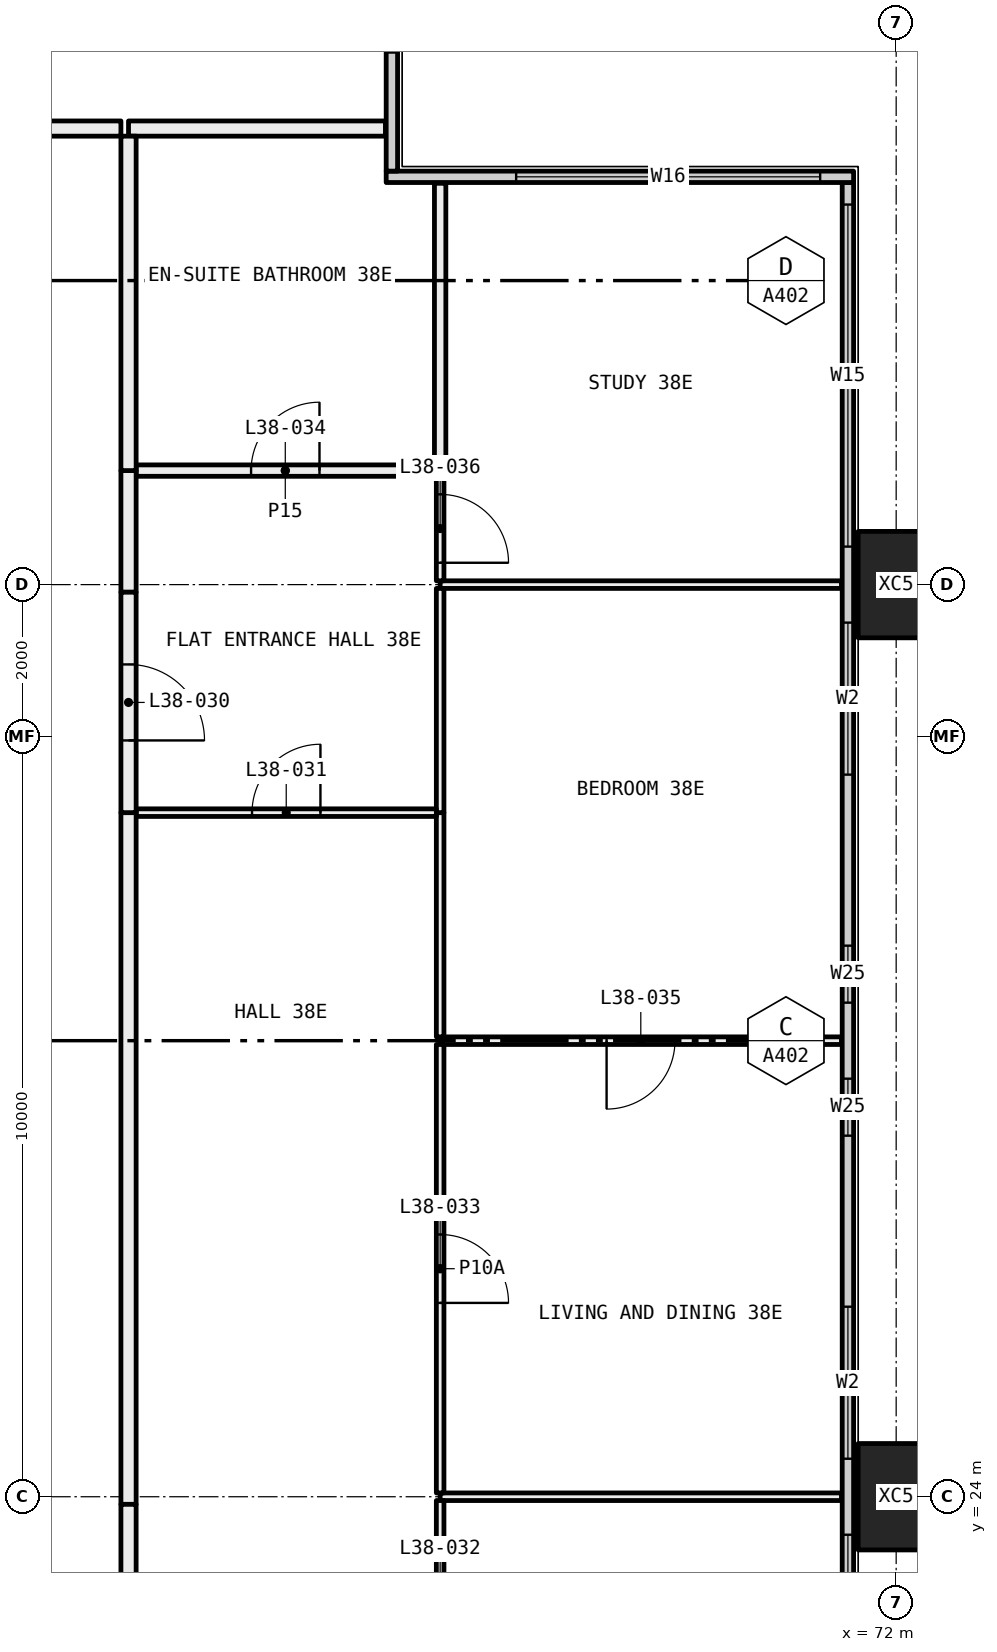
"""IFC4 building model, lengths in metres.
Left out: names, types, materials, properties, quantities, classifications, styles, units other than length and angle.
Written with IfcOpenShell. Run it as: python <this file> out.ifc"""

import sys

from ifc_helpers import new_model, si_unit, direction, frame, frame_2d, origin, origin_2d, place, context, subcontext, project, spatial, rectangle, hollow_rectangle, extrude, element, fill, save


model = new_model("IFC4")
c1 = context("Model", 3, precision=1e-05, world=origin(), true_north=direction((0.0, 1.0)))
c2 = subcontext(c1, "Body", "Model", "MODEL_VIEW")
j1 = project(units=[si_unit("LENGTHUNIT", "METRE"), si_unit("PLANEANGLEUNIT", "RADIAN")], contexts=[c1])
p1 = place(None, origin())
s1 = spatial("IfcSite", under=j1, at=p1, CompositionType="ELEMENT")
p2 = place(p1, origin())
s2 = spatial("IfcBuilding", under=s1, at=p2, CompositionType="ELEMENT")
p3 = place(p2, frame((0.0, 0.0, 144.9)))
s3 = spatial("IfcBuildingStorey", under=s2, at=p3, CompositionType="ELEMENT", Elevation=144.9)
for number, where, z_axis, x_axis in (
    (1, (72.0, 24.0, -0.4), (0.0, 0.0, 1.0), (0.0, 1.0, 0.0)),
    (2, (72.0, 36.0, -0.4), (0.0, 0.0, 1.0), (0.0, 1.0, 0.0)),
):
    element("IfcColumn", number, at=place(p3, frame(where, z_axis=z_axis, x_axis=x_axis)), inside=s3, PredefinedType="COLUMN", context=c2, shape_type="SweptSolid", body=[
        extrude(hollow_rectangle(XDim=1.4, YDim=1.0, WallThickness=0.055, at=origin_2d()), origin(), (0.0, 0.0, 1.0), 3.45),
    ])
p4 = place(p3, frame((71.365, 18.71, 0.0), z_axis=(0.0, 0.0, 1.0), x_axis=(0.0, 1.0, 0.0)))
e3 = element("IfcWall", 3, at=p4, inside=s3, PredefinedType="ELEMENTEDWALL", context=c2, shape_type="SweptSolid", body=[
    extrude(rectangle(XDim=22.58, YDim=0.15, at=frame_2d((11.29, 0.0))), origin(), (0.0, 0.0, 1.0), 3.05),
])
p5 = place(p4, frame((0.29, 0.0, 0.45)))
e4 = element("IfcOpeningElement", 4, at=p5, cuts=e3, PredefinedType="OPENING", context=c2, shape_type="SweptSolid", body=[
    extrude(rectangle(XDim=4.5, YDim=2.55, at=frame_2d((2.25, 1.275))), frame((0.0, 0.085, 0.0), z_axis=(0.0, -1.0, 0.0), x_axis=(1.0, 0.0, 0.0)), (0.0, 0.0, 1.0), 0.17),
])
p6 = place(p4, frame((5.79, 0.0, 0.45)))
e5 = element("IfcOpeningElement", 5, at=p6, cuts=e3, PredefinedType="OPENING", context=c2, shape_type="SweptSolid", body=[
    extrude(rectangle(XDim=2.0, YDim=2.55, at=frame_2d((1.0, 1.275))), frame((0.0, 0.085, 0.0), z_axis=(0.0, -1.0, 0.0), x_axis=(1.0, 0.0, 0.0)), (0.0, 0.0, 1.0), 0.17),
])
p7 = place(p4, frame((10.04, 0.0, 0.45)))
e6 = element("IfcOpeningElement", 6, at=p7, cuts=e3, PredefinedType="OPENING", context=c2, shape_type="SweptSolid", body=[
    extrude(rectangle(XDim=0.75, YDim=2.55, at=frame_2d((0.375, 1.275))), frame((0.0, 0.085, 0.0), z_axis=(0.0, -1.0, 0.0), x_axis=(1.0, 0.0, 0.0)), (0.0, 0.0, 1.0), 0.17),
])
p8 = place(p4, frame((11.79, 0.0, 0.45)))
e7 = element("IfcOpeningElement", 7, at=p8, cuts=e3, PredefinedType="OPENING", context=c2, shape_type="SweptSolid", body=[
    extrude(rectangle(XDim=0.75, YDim=2.55, at=frame_2d((0.375, 1.275))), frame((0.0, 0.085, 0.0), z_axis=(0.0, -1.0, 0.0), x_axis=(1.0, 0.0, 0.0)), (0.0, 0.0, 1.0), 0.17),
])
p9 = place(p4, frame((14.79, 0.0, 0.45)))
e8 = element("IfcOpeningElement", 8, at=p9, cuts=e3, PredefinedType="OPENING", context=c2, shape_type="SweptSolid", body=[
    extrude(rectangle(XDim=2.0, YDim=2.55, at=frame_2d((1.0, 1.275))), frame((0.0, 0.085, 0.0), z_axis=(0.0, -1.0, 0.0), x_axis=(1.0, 0.0, 0.0)), (0.0, 0.0, 1.0), 0.17),
])
p10 = place(p4, frame((17.79, 0.0, 0.45)))
e9 = element("IfcOpeningElement", 9, at=p10, cuts=e3, PredefinedType="OPENING", context=c2, shape_type="SweptSolid", body=[
    extrude(rectangle(XDim=4.5, YDim=2.55, at=frame_2d((2.25, 1.275))), frame((0.0, 0.085, 0.0), z_axis=(0.0, -1.0, 0.0), x_axis=(1.0, 0.0, 0.0)), (0.0, 0.0, 1.0), 0.17),
])
p11 = place(p3, frame((65.29, 41.365, 0.0), z_axis=(0.0, 0.0, 1.0), x_axis=(1.0, 0.0, 0.0)))
e10 = element("IfcWall", 10, at=p11, inside=s3, PredefinedType="ELEMENTEDWALL", context=c2, shape_type="SweptSolid", body=[
    extrude(rectangle(XDim=6.15, YDim=0.15, at=frame_2d((3.075, 0.0))), origin(), (0.0, 0.0, 1.0), 3.05),
])
p12 = place(p11, frame((1.71, 0.0, 0.45)))
e11 = element("IfcOpeningElement", 11, at=p12, cuts=e10, PredefinedType="OPENING", context=c2, shape_type="SweptSolid", body=[
    extrude(rectangle(XDim=4.0, YDim=2.55, at=frame_2d((2.0, 1.275))), frame((0.0, 0.085, 0.0), z_axis=(0.0, -1.0, 0.0), x_axis=(1.0, 0.0, 0.0)), (0.0, 0.0, 1.0), 0.17),
])
p13 = place(p3, frame((65.365, 41.44, 0.0), z_axis=(0.0, 0.0, 1.0), x_axis=(0.0, 1.0, 0.0)))
e12 = element("IfcWall", 12, at=p13, inside=s3, PredefinedType="ELEMENTEDWALL", context=c2, shape_type="SweptSolid", body=[
    extrude(rectangle(XDim=5.85, YDim=0.15, at=frame_2d((2.925, 0.0))), origin(), (0.0, 0.0, 1.0), 3.05),
])
p14 = place(p13, frame((1.56, 0.0, 0.45)))
e13 = element("IfcOpeningElement", 13, at=p14, cuts=e12, PredefinedType="OPENING", context=c2, shape_type="SweptSolid", body=[
    extrude(rectangle(XDim=4.0, YDim=2.55, at=frame_2d((2.0, 1.275))), frame((0.0, 0.085, 0.0), z_axis=(0.0, -1.0, 0.0), x_axis=(1.0, 0.0, 0.0)), (0.0, 0.0, 1.0), 0.17),
])
p15 = place(p3, frame((71.28, 24.0, 0.0), z_axis=(0.0, 0.0, 1.0), x_axis=(-1.0, 0.0, 0.0)))
e14 = element("IfcWall", 14, at=p15, inside=s3, PredefinedType="PARTITIONING", context=c2, shape_type="SweptSolid", body=[
    extrude(rectangle(XDim=5.28, YDim=0.1, at=frame_2d((2.64, 0.0))), origin(), (0.0, 0.0, 1.0), 2.45),
])
p16 = place(p3, frame((66.0, 23.95, 0.0), z_axis=(0.0, 0.0, 1.0), x_axis=(0.0, -1.0, 0.0)))
e15 = element("IfcWall", 15, at=p16, inside=s3, PredefinedType="PARTITIONING", context=c2, shape_type="SweptSolid", body=[
    extrude(rectangle(XDim=2.875, YDim=0.1, at=frame_2d((1.438, 0.0))), origin(), (0.0, 0.0, 1.0), 2.45),
])
p17 = place(p16, frame((0.988, 0.0, 0.0)))
e16 = element("IfcOpeningElement", 16, at=p17, cuts=e15, PredefinedType="OPENING", context=c2, shape_type="SweptSolid", body=[
    extrude(rectangle(XDim=0.9, YDim=2.1, at=frame_2d((0.45, 1.05))), frame((0.0, 0.06, 0.0), z_axis=(0.0, -1.0, 0.0), x_axis=(1.0, 0.0, 0.0)), (0.0, 0.0, 1.0), 0.12),
])
p18 = place(p3, frame((71.28, 30.0, 0.0), z_axis=(0.0, 0.0, 1.0), x_axis=(-1.0, 0.0, 0.0)))
e17 = element("IfcWall", 17, at=p18, inside=s3, PredefinedType="PARTITIONING", context=c2, shape_type="SweptSolid", body=[
    extrude(rectangle(XDim=5.28, YDim=0.1, at=frame_2d((2.64, 0.0))), origin(), (0.0, 0.0, 1.0), 3.05),
])
p19 = place(p18, frame((2.19, 0.0, 0.0)))
e18 = element("IfcOpeningElement", 18, at=p19, cuts=e17, PredefinedType="OPENING", context=c2, shape_type="SweptSolid", body=[
    extrude(rectangle(XDim=0.9, YDim=2.1, at=frame_2d((0.45, 1.05))), frame((0.0, 0.06, 0.0), z_axis=(0.0, -1.0, 0.0), x_axis=(1.0, 0.0, 0.0)), (0.0, 0.0, 1.0), 0.12),
])
p20 = place(p3, frame((66.0, 29.95, 0.0), z_axis=(0.0, 0.0, 1.0), x_axis=(0.0, -1.0, 0.0)))
e19 = element("IfcWall", 19, at=p20, inside=s3, PredefinedType="PARTITIONING", context=c2, shape_type="SweptSolid", body=[
    extrude(rectangle(XDim=5.9, YDim=0.1, at=frame_2d((2.95, 0.0))), origin(), (0.0, 0.0, 1.0), 2.45),
])
p21 = place(p20, frame((2.5, 0.0, 0.0)))
e20 = element("IfcOpeningElement", 20, at=p21, cuts=e19, PredefinedType="OPENING", context=c2, shape_type="SweptSolid", body=[
    extrude(rectangle(XDim=0.9, YDim=2.1, at=frame_2d((0.45, 1.05))), frame((0.0, 0.06, 0.0), z_axis=(0.0, -1.0, 0.0), x_axis=(1.0, 0.0, 0.0)), (0.0, 0.0, 1.0), 0.12),
])
p22 = place(p3, frame((71.28, 36.0, 0.0), z_axis=(0.0, 0.0, 1.0), x_axis=(-1.0, 0.0, 0.0)))
e21 = element("IfcWall", 21, at=p22, inside=s3, PredefinedType="PARTITIONING", context=c2, shape_type="SweptSolid", body=[
    extrude(rectangle(XDim=5.28, YDim=0.1, at=frame_2d((2.64, 0.0))), origin(), (0.0, 0.0, 1.0), 2.45),
])
p23 = place(p3, frame((66.0, 33.0, 0.0), z_axis=(0.0, 0.0, 1.0), x_axis=(0.0, -1.0, 0.0)))
e22 = element("IfcWall", 22, at=p23, inside=s3, PredefinedType="PARTITIONING", context=c2, shape_type="SweptSolid", body=[
    extrude(rectangle(XDim=2.95, YDim=0.1, at=frame_2d((1.475, 0.0))), origin(), (0.0, 0.0, 1.0), 3.05),
])
p24 = place(p3, frame((66.0, 35.95, 0.0), z_axis=(0.0, 0.0, 1.0), x_axis=(0.0, -1.0, 0.0)))
e23 = element("IfcWall", 23, at=p24, inside=s3, PredefinedType="PARTITIONING", context=c2, shape_type="SweptSolid", body=[
    extrude(rectangle(XDim=2.95, YDim=0.1, at=frame_2d((1.475, 0.0))), origin(), (0.0, 0.0, 1.0), 2.45),
])
p25 = place(p3, frame((66.0, 37.425, 0.0), z_axis=(0.0, 0.0, 1.0), x_axis=(0.0, -1.0, 0.0)))
e24 = element("IfcWall", 24, at=p25, inside=s3, PredefinedType="PARTITIONING", context=c2, shape_type="SweptSolid", body=[
    extrude(rectangle(XDim=1.375, YDim=0.1, at=frame_2d((0.688, 0.0))), origin(), (0.0, 0.0, 1.0), 2.45),
])
p26 = place(p25, frame((0.238, 0.0, 0.0)))
e25 = element("IfcOpeningElement", 25, at=p26, cuts=e24, PredefinedType="OPENING", context=c2, shape_type="SweptSolid", body=[
    extrude(rectangle(XDim=0.9, YDim=2.1, at=frame_2d((0.45, 1.05))), frame((0.0, 0.06, 0.0), z_axis=(0.0, -1.0, 0.0), x_axis=(1.0, 0.0, 0.0)), (0.0, 0.0, 1.0), 0.12),
])
p27 = place(p3, frame((66.0, 41.28, 0.0), z_axis=(0.0, 0.0, 1.0), x_axis=(0.0, -1.0, 0.0)))
e26 = element("IfcWall", 26, at=p27, inside=s3, PredefinedType="PARTITIONING", context=c2, shape_type="SweptSolid", body=[
    extrude(rectangle(XDim=3.78, YDim=0.15, at=frame_2d((1.89, 0.0))), origin(), (0.0, 0.0, 1.0), 3.05),
])
p28 = place(p3, frame((65.95, 33.0, 0.0), z_axis=(0.0, 0.0, 1.0), x_axis=(-1.0, 0.0, 0.0)))
e27 = element("IfcWall", 27, at=p28, inside=s3, PredefinedType="PARTITIONING", context=c2, shape_type="SweptSolid", body=[
    extrude(rectangle(XDim=3.95, YDim=0.1, at=frame_2d((1.975, 0.0))), origin(), (0.0, 0.0, 1.0), 3.05),
])
p29 = place(p28, frame((1.525, 0.0, 0.0)))
e28 = element("IfcOpeningElement", 28, at=p29, cuts=e27, PredefinedType="OPENING", context=c2, shape_type="SweptSolid", body=[
    extrude(rectangle(XDim=0.9, YDim=2.1, at=frame_2d((0.45, 1.05))), frame((0.0, 0.06, 0.0), z_axis=(0.0, -1.0, 0.0), x_axis=(1.0, 0.0, 0.0)), (0.0, 0.0, 1.0), 0.12),
])
p30 = place(p3, frame((61.9, 33.0, 0.0), z_axis=(0.0, 0.0, 1.0), x_axis=(0.0, -1.0, 0.0)))
e29 = element("IfcWall", 29, at=p30, inside=s3, PredefinedType="PARTITIONING", context=c2, shape_type="SweptSolid", body=[
    extrude(rectangle(XDim=9.1, YDim=0.2, at=frame_2d((4.55, 0.0))), origin(), (0.0, 0.0, 1.0), 2.45),
])
p31 = place(p3, frame((61.9, 23.9, 0.0), z_axis=(0.0, 0.0, 1.0), x_axis=(0.0, -1.0, 0.0)))
e30 = element("IfcWall", 30, at=p31, inside=s3, PredefinedType="PARTITIONING", context=c2, shape_type="SweptSolid", body=[
    extrude(rectangle(XDim=2.9, YDim=0.2, at=frame_2d((1.45, 0.0))), origin(), (0.0, 0.0, 1.0), 3.05),
])
p32 = place(p3, frame((65.925, 37.5, 0.0), z_axis=(0.0, 0.0, 1.0), x_axis=(-1.0, 0.0, 0.0)))
e31 = element("IfcWall", 31, at=p32, inside=s3, PredefinedType="PARTITIONING", context=c2, shape_type="SweptSolid", body=[
    extrude(rectangle(XDim=3.925, YDim=0.15, at=frame_2d((1.962, 0.0))), origin(), (0.0, 0.0, 1.0), 3.05),
])
p33 = place(p32, frame((1.512, 0.0, 0.0)))
e32 = element("IfcOpeningElement", 32, at=p33, cuts=e31, PredefinedType="OPENING", context=c2, shape_type="SweptSolid", body=[
    extrude(rectangle(XDim=0.9, YDim=2.1, at=frame_2d((0.45, 1.05))), frame((0.0, 0.085, 0.0), z_axis=(0.0, -1.0, 0.0), x_axis=(1.0, 0.0, 0.0)), (0.0, 0.0, 1.0), 0.17),
])
p34 = place(p3, frame((61.9, 37.5, 0.0), z_axis=(0.0, 0.0, 1.0), x_axis=(0.0, -1.0, 0.0)))
e33 = element("IfcWall", 33, at=p34, inside=s3, PredefinedType="PARTITIONING", context=c2, shape_type="SweptSolid", body=[
    extrude(rectangle(XDim=1.6, YDim=0.2, at=frame_2d((0.8, 0.0))), origin(), (0.0, 0.0, 1.0), 2.45),
])
p35 = place(p3, frame((61.9, 35.9, 0.0), z_axis=(0.0, 0.0, 1.0), x_axis=(0.0, -1.0, 0.0)))
e34 = element("IfcWall", 34, at=p35, inside=s3, PredefinedType="PARTITIONING", context=c2, shape_type="SweptSolid", body=[
    extrude(rectangle(XDim=2.9, YDim=0.2, at=frame_2d((1.45, 0.0))), origin(), (0.0, 0.0, 1.0), 3.05),
])
p36 = place(p35, frame((0.95, 0.0, 0.0)))
e35 = element("IfcOpeningElement", 35, at=p36, cuts=e34, PredefinedType="OPENING", context=c2, shape_type="SweptSolid", body=[
    extrude(rectangle(XDim=1.0, YDim=2.1, at=frame_2d((0.5, 1.05))), frame((0.0, 0.11, 0.0), z_axis=(0.0, -1.0, 0.0), x_axis=(1.0, 0.0, 0.0)), (0.0, 0.0, 1.0), 0.22),
])
p37 = place(p3, frame((65.28, 42.0, 0.0), z_axis=(0.0, 0.0, 1.0), x_axis=(-1.0, 0.0, 0.0)))
e36 = element("IfcWall", 36, at=p37, inside=s3, PredefinedType="PARTITIONING", context=c2, shape_type="SweptSolid", body=[
    extrude(rectangle(XDim=3.38, YDim=0.2, at=frame_2d((1.69, 0.0))), origin(), (0.0, 0.0, 1.0), 3.05),
])
p38 = place(p3, frame((61.9, 41.9, 0.0), z_axis=(0.0, 0.0, 1.0), x_axis=(0.0, -1.0, 0.0)))
e37 = element("IfcWall", 37, at=p38, inside=s3, PredefinedType="PARTITIONING", context=c2, shape_type="SweptSolid", body=[
    extrude(rectangle(XDim=4.4, YDim=0.2, at=frame_2d((2.2, 0.0))), origin(), (0.0, 0.0, 1.0), 3.05),
])
p39 = place(p3, frame((60.0, 42.0, 0.0), z_axis=(0.0, 0.0, 1.0), x_axis=(1.0, 0.0, 0.0)))
e38 = element("IfcWall", 38, at=p39, inside=s3, PredefinedType="PARTITIONING", context=c2, shape_type="SweptSolid", body=[
    extrude(rectangle(XDim=1.8, YDim=0.2, at=frame_2d((0.9, 0.0))), origin(), (0.0, 0.0, 1.0), 3.05),
])
p40 = place(p5, origin())
e39 = element("IfcWindow", 39, at=p40, inside=s3, PartitioningType="SINGLE_PANEL", PredefinedType="WINDOW", context=c2, shape_type="SweptSolid", body=[
    extrude(rectangle(XDim=4.5, YDim=2.55, at=frame_2d((2.25, 1.275))), frame((0.0, 0.03, 0.0), z_axis=(0.0, -1.0, 0.0), x_axis=(1.0, 0.0, 0.0)), (0.0, 0.0, 1.0), 0.06),
])
fill(e4, e39)
p41 = place(p6, origin())
e40 = element("IfcWindow", 40, at=p41, inside=s3, PartitioningType="SINGLE_PANEL", PredefinedType="WINDOW", context=c2, shape_type="SweptSolid", body=[
    extrude(rectangle(XDim=2.0, YDim=2.55, at=frame_2d((1.0, 1.275))), frame((0.0, 0.03, 0.0), z_axis=(0.0, -1.0, 0.0), x_axis=(1.0, 0.0, 0.0)), (0.0, 0.0, 1.0), 0.06),
])
fill(e5, e40)
p42 = place(p7, origin())
e41 = element("IfcWindow", 41, at=p42, inside=s3, PartitioningType="SINGLE_PANEL", PredefinedType="WINDOW", context=c2, shape_type="SweptSolid", body=[
    extrude(rectangle(XDim=0.75, YDim=2.55, at=frame_2d((0.375, 1.275))), frame((0.0, 0.03, 0.0), z_axis=(0.0, -1.0, 0.0), x_axis=(1.0, 0.0, 0.0)), (0.0, 0.0, 1.0), 0.06),
])
fill(e6, e41)
p43 = place(p8, origin())
e42 = element("IfcWindow", 42, at=p43, inside=s3, PartitioningType="SINGLE_PANEL", PredefinedType="WINDOW", context=c2, shape_type="SweptSolid", body=[
    extrude(rectangle(XDim=0.75, YDim=2.55, at=frame_2d((0.375, 1.275))), frame((0.0, 0.03, 0.0), z_axis=(0.0, -1.0, 0.0), x_axis=(1.0, 0.0, 0.0)), (0.0, 0.0, 1.0), 0.06),
])
fill(e7, e42)
p44 = place(p9, origin())
e43 = element("IfcWindow", 43, at=p44, inside=s3, PartitioningType="SINGLE_PANEL", PredefinedType="WINDOW", context=c2, shape_type="SweptSolid", body=[
    extrude(rectangle(XDim=2.0, YDim=2.55, at=frame_2d((1.0, 1.275))), frame((0.0, 0.03, 0.0), z_axis=(0.0, -1.0, 0.0), x_axis=(1.0, 0.0, 0.0)), (0.0, 0.0, 1.0), 0.06),
])
fill(e8, e43)
p45 = place(p10, origin())
e44 = element("IfcWindow", 44, at=p45, inside=s3, PartitioningType="SINGLE_PANEL", PredefinedType="WINDOW", context=c2, shape_type="SweptSolid", body=[
    extrude(rectangle(XDim=4.5, YDim=2.55, at=frame_2d((2.25, 1.275))), frame((0.0, 0.03, 0.0), z_axis=(0.0, -1.0, 0.0), x_axis=(1.0, 0.0, 0.0)), (0.0, 0.0, 1.0), 0.06),
])
fill(e9, e44)
p46 = place(p12, origin())
e45 = element("IfcWindow", 45, at=p46, inside=s3, PartitioningType="SINGLE_PANEL", PredefinedType="WINDOW", context=c2, shape_type="SweptSolid", body=[
    extrude(rectangle(XDim=4.0, YDim=2.55, at=frame_2d((2.0, 1.275))), frame((0.0, 0.03, 0.0), z_axis=(0.0, -1.0, 0.0), x_axis=(1.0, 0.0, 0.0)), (0.0, 0.0, 1.0), 0.06),
])
fill(e11, e45)
p47 = place(p36, origin())
e46 = element("IfcDoor", 46, at=p47, inside=s3, OperationType="SINGLE_SWING_LEFT", PredefinedType="DOOR", context=c2, shape_type="SweptSolid", body=[
    extrude(rectangle(XDim=1.0, YDim=2.1, at=frame_2d((0.5, 1.05))), frame((0.0, 0.025, 0.0), z_axis=(0.0, -1.0, 0.0), x_axis=(1.0, 0.0, 0.0)), (0.0, 0.0, 1.0), 0.05),
])
fill(e35, e46)
p48 = place(p29, frame((0.9, 0.0, 0.0), x_axis=(-1.0, 0.0, 0.0)))
e47 = element("IfcDoor", 47, at=p48, inside=s3, OperationType="SINGLE_SWING_LEFT", PredefinedType="DOOR", context=c2, shape_type="SweptSolid", body=[
    extrude(rectangle(XDim=0.9, YDim=2.1, at=frame_2d((0.45, 1.05))), frame((0.0, 0.025, 0.0), z_axis=(0.0, -1.0, 0.0), x_axis=(1.0, 0.0, 0.0)), (0.0, 0.0, 1.0), 0.05),
])
fill(e28, e47)
p49 = place(p21, origin())
e48 = element("IfcDoor", 48, at=p49, inside=s3, OperationType="SINGLE_SWING_LEFT", PredefinedType="DOOR", context=c2, shape_type="SweptSolid", body=[
    extrude(rectangle(XDim=0.9, YDim=2.1, at=frame_2d((0.45, 1.05))), frame((0.0, 0.025, 0.0), z_axis=(0.0, -1.0, 0.0), x_axis=(1.0, 0.0, 0.0)), (0.0, 0.0, 1.0), 0.05),
])
fill(e20, e48)
p50 = place(p33, frame((0.9, 0.0, 0.0), x_axis=(-1.0, 0.0, 0.0)))
e49 = element("IfcDoor", 49, at=p50, inside=s3, OperationType="SINGLE_SWING_LEFT", PredefinedType="DOOR", context=c2, shape_type="SweptSolid", body=[
    extrude(rectangle(XDim=0.9, YDim=2.1, at=frame_2d((0.45, 1.05))), frame((0.0, 0.025, 0.0), z_axis=(0.0, -1.0, 0.0), x_axis=(1.0, 0.0, 0.0)), (0.0, 0.0, 1.0), 0.05),
])
fill(e32, e49)
p51 = place(p19, origin())
e50 = element("IfcDoor", 50, at=p51, inside=s3, OperationType="SINGLE_SWING_LEFT", PredefinedType="DOOR", context=c2, shape_type="SweptSolid", body=[
    extrude(rectangle(XDim=0.9, YDim=2.1, at=frame_2d((0.45, 1.05))), frame((0.0, 0.025, 0.0), z_axis=(0.0, -1.0, 0.0), x_axis=(1.0, 0.0, 0.0)), (0.0, 0.0, 1.0), 0.05),
])
fill(e18, e50)
p52 = place(p26, origin())
e51 = element("IfcDoor", 51, at=p52, inside=s3, OperationType="SINGLE_SWING_LEFT", PredefinedType="DOOR", context=c2, shape_type="SweptSolid", body=[
    extrude(rectangle(XDim=0.9, YDim=2.1, at=frame_2d((0.45, 1.05))), frame((0.0, 0.025, 0.0), z_axis=(0.0, -1.0, 0.0), x_axis=(1.0, 0.0, 0.0)), (0.0, 0.0, 1.0), 0.05),
])
fill(e25, e51)
save(model, sys.argv[1])
